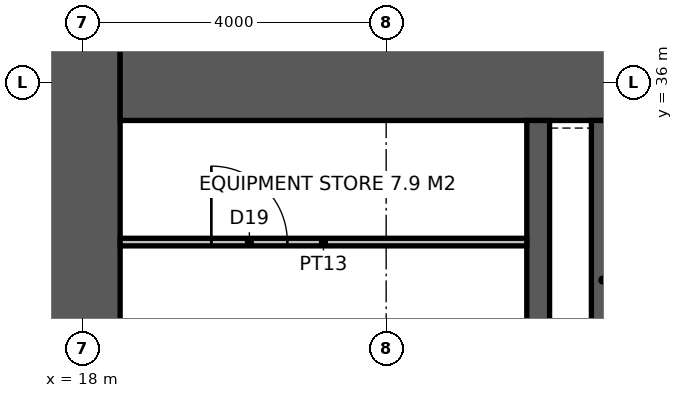
"""IFC4 building model, lengths in metres.
Left out: names, types, materials, properties, quantities, classifications, styles, units other than length and angle.
Written with IfcOpenShell. Run it as: python <this file> out.ifc"""

import sys

from ifc_helpers import new_model, si_unit, direction, frame, frame_2d, origin, place, context, subcontext, project, spatial, rectangle, extrude, element, fill, save


model = new_model("IFC4")
c1 = context("Model", 3, precision=1e-05, world=origin(), true_north=direction((0.0, 1.0)))
c2 = subcontext(c1, "Body", "Model", "MODEL_VIEW")
j1 = project(units=[si_unit("LENGTHUNIT", "METRE"), si_unit("PLANEANGLEUNIT", "RADIAN")], contexts=[c1])
p1 = place(None, origin())
s1 = spatial("IfcSite", under=j1, at=p1, CompositionType="ELEMENT")
p2 = place(p1, origin())
s2 = spatial("IfcBuilding", under=s1, at=p2, CompositionType="ELEMENT")
p3 = place(p2, frame((0.0, 0.0, 27.0)))
s3 = spatial("IfcBuildingStorey", under=s2, at=p3, CompositionType="ELEMENT", Elevation=27.0)
p4 = place(p3, frame((18.0, 17.1, -0.15), z_axis=(0.0, 0.0, 1.0), x_axis=(0.0, 1.0, 0.0)))
e1 = element("IfcWall", 1, at=p4, inside=s3, PredefinedType="SHEAR", context=c2, shape_type="SweptSolid", body=[
    extrude(rectangle(XDim=19.8, YDim=1.0, at=frame_2d((9.9, 0.0))), origin(), (0.0, 0.0, 1.0), 4.0),
])
p5 = place(p3, frame((18.5, 36.2, -0.15), z_axis=(0.0, 0.0, 1.0), x_axis=(1.0, 0.0, 0.0)))
e2 = element("IfcWall", 2, at=p5, inside=s3, PredefinedType="SHEAR", context=c2, shape_type="SweptSolid", body=[
    extrude(rectangle(XDim=23.0, YDim=1.4, at=frame_2d((11.5, 0.0))), origin(), (0.0, 0.0, 1.0), 4.0),
])
p6 = place(p3, frame((24.0, 18.5, -0.15), z_axis=(0.0, 0.0, 1.0), x_axis=(0.0, 1.0, 0.0)))
e3 = element("IfcWall", 3, at=p6, inside=s3, PredefinedType="SHEAR", context=c2, shape_type="SweptSolid", body=[
    extrude(rectangle(XDim=17.0, YDim=0.3, at=frame_2d((8.5, 0.0))), origin(), (0.0, 0.0, 1.0), 4.0),
])
p7 = place(p6, frame((9.6, 0.0, 0.15)))
e4 = element("IfcOpeningElement", 4, at=p7, cuts=e3, PredefinedType="OPENING", context=c2, shape_type="SweptSolid", body=[
    extrude(rectangle(XDim=1.5, YDim=2.4, at=frame_2d((0.75, 1.2))), frame((0.0, 0.16, 0.0), z_axis=(0.0, -1.0, 0.0), x_axis=(1.0, 0.0, 0.0)), (0.0, 0.0, 1.0), 0.32),
])
p8 = place(p3, frame((24.85, 31.3, -0.15), z_axis=(0.0, 0.0, 1.0), x_axis=(0.0, 1.0, 0.0)))
e5 = element("IfcWall", 5, at=p8, inside=s3, PredefinedType="SHEAR", context=c2, shape_type="SweptSolid", body=[
    extrude(rectangle(XDim=4.2, YDim=0.3, at=frame_2d((2.1, 0.0))), origin(), (0.0, 0.0, 1.0), 4.0),
])
p9 = place(p3, frame((18.5, 33.9, 0.0), z_axis=(0.0, 0.0, 1.0), x_axis=(1.0, 0.0, 0.0)))
e6 = element("IfcWall", 6, at=p9, inside=s3, PredefinedType="PARTITIONING", context=c2, shape_type="SweptSolid", body=[
    extrude(rectangle(XDim=5.35, YDim=0.1, at=frame_2d((2.675, 0.0))), origin(), (0.0, 0.0, 1.0), 3.85),
])
p10 = place(p9, frame((1.2, 0.0, 0.0)))
e7 = element("IfcOpeningElement", 7, at=p10, cuts=e6, PredefinedType="OPENING", context=c2, shape_type="SweptSolid", body=[
    extrude(rectangle(XDim=1.0, YDim=2.2, at=frame_2d((0.5, 1.1))), frame((0.0, 0.06, 0.0), z_axis=(0.0, -1.0, 0.0), x_axis=(1.0, 0.0, 0.0)), (0.0, 0.0, 1.0), 0.12),
])
p11 = place(p10, origin())
e8 = element("IfcDoor", 8, at=p11, inside=s3, OperationType="SINGLE_SWING_LEFT", PredefinedType="DOOR", context=c2, shape_type="SweptSolid", body=[
    extrude(rectangle(XDim=1.0, YDim=2.2, at=frame_2d((0.5, 1.1))), frame((0.0, 0.025, 0.0), z_axis=(0.0, -1.0, 0.0), x_axis=(1.0, 0.0, 0.0)), (0.0, 0.0, 1.0), 0.05),
])
fill(e7, e8)
save(model, sys.argv[1])
